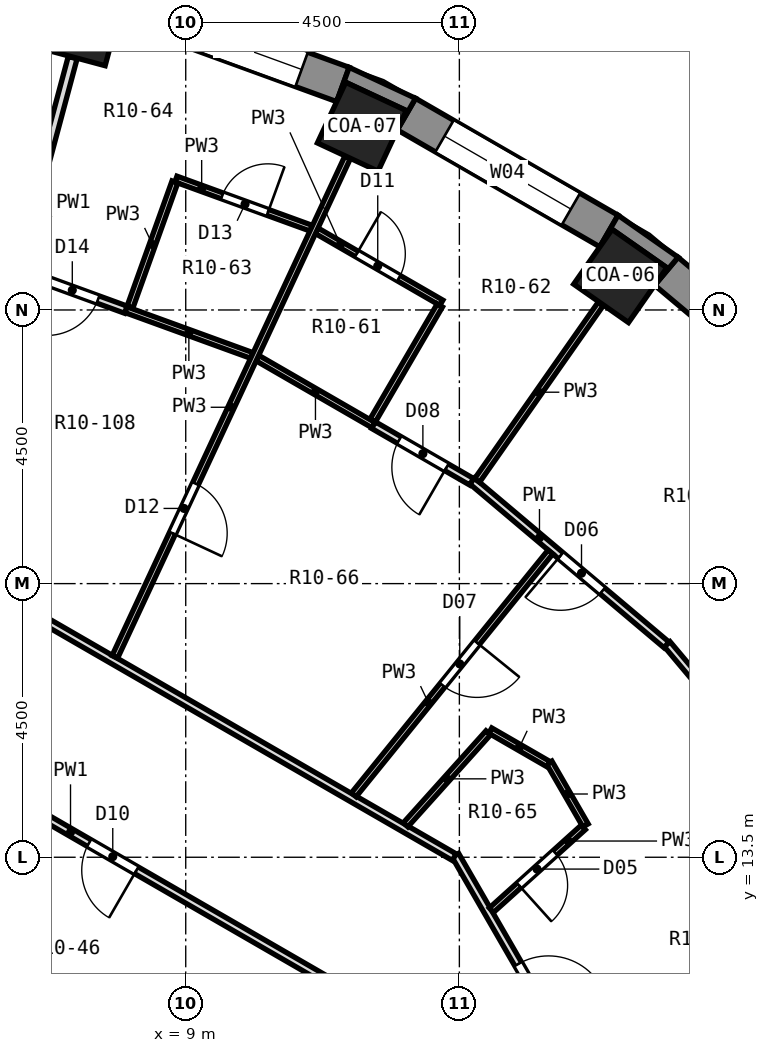
"""IFC4 building model, lengths in metres.
Left out: names, types, materials, properties, quantities, classifications, styles, units other than length and angle.
Written with IfcOpenShell. Run it as: python <this file> out.ifc"""

import sys

from ifc_helpers import new_model, si_unit, direction, frame, frame_2d, origin, origin_2d, place, context, subcontext, project, spatial, polyline, rectangle, outline, extrude, element, fill, save


model = new_model("IFC4")
c1 = context("Model", 3, precision=1e-05, world=origin(), true_north=direction((0.0, 1.0)))
c2 = subcontext(c1, "Body", "Model", "MODEL_VIEW")
j1 = project(units=[si_unit("LENGTHUNIT", "METRE"), si_unit("PLANEANGLEUNIT", "RADIAN")], contexts=[c1])
p1 = place(None, origin())
s1 = spatial("IfcSite", under=j1, at=p1, CompositionType="ELEMENT")
p2 = place(p1, origin())
s2 = spatial("IfcBuilding", under=s1, at=p2, CompositionType="ELEMENT")
p3 = place(p2, frame((0.0, 0.0, 36.2)))
s3 = spatial("IfcBuildingStorey", under=s2, at=p3, CompositionType="ELEMENT", Elevation=36.2)
for number, where, z_axis, x_axis in (
    (1, (16.146, 23.059, 0.0), (0.0, 0.0, 1.0), (0.574, 0.819, 0.0)),
    (2, (11.897, 25.512, 0.0), (0.0, 0.0, 1.0), (0.423, 0.906, 0.0)),
    (3, (7.286, 27.191, 0.0), (0.0, 0.0, 1.0), (0.259, 0.966, 0.0)),
):
    element("IfcColumn", number, at=place(p3, frame(where, z_axis=z_axis, x_axis=x_axis)), inside=s3, PredefinedType="COLUMN", context=c2, shape_type="SweptSolid", body=[
        extrude(rectangle(XDim=1.1, YDim=1.1, at=origin_2d()), origin(), (0.0, 0.0, 1.0), 3.3),
    ])
p4 = place(p3, frame((19.85, 20.665, 0.0), z_axis=(0.0, 0.0, 1.0), x_axis=(-0.766026164483, 0.642809392687, 0.0)))
e4 = element("IfcWall", 4, at=p4, inside=s3, PredefinedType="SOLIDWALL", context=c2, shape_type="SweptSolid", body=[
    extrude(rectangle(XDim=3.846, YDim=0.6, at=frame_2d((1.923, 0.0))), origin(), (0.0, 0.0, 1.0), 2.75),
])
p5 = place(p4, frame((0.723, 0.0, 0.9)))
e5 = element("IfcOpeningElement", 5, at=p5, cuts=e4, PredefinedType="OPENING", context=c2, shape_type="SweptSolid", body=[
    extrude(rectangle(XDim=2.4, YDim=1.8, at=frame_2d((1.2, 0.9))), frame((0.0, 0.312, 0.0), z_axis=(0.0, -1.0, 0.0), x_axis=(1.0, 0.0, 0.0)), (0.0, 0.0, 1.0), 0.624),
])
p6 = place(p3, frame((15.96, 23.798, 0.0), z_axis=(0.0, 0.0, 1.0), x_axis=(-0.86603124159, 0.499989888488, 0.0)))
e6 = element("IfcWall", 6, at=p6, inside=s3, PredefinedType="SOLIDWALL", context=c2, shape_type="SweptSolid", body=[
    extrude(rectangle(XDim=3.846, YDim=0.6, at=frame_2d((1.923, 0.0))), origin(), (0.0, 0.0, 1.0), 2.75),
])
p7 = place(p6, frame((0.723, 0.0, 0.9)))
e7 = element("IfcOpeningElement", 7, at=p7, cuts=e6, PredefinedType="OPENING", context=c2, shape_type="SweptSolid", body=[
    extrude(rectangle(XDim=2.4, YDim=1.8, at=frame_2d((1.2, 0.9))), frame((0.0, 0.312, 0.0), z_axis=(0.0, -1.0, 0.0), x_axis=(1.0, 0.0, 0.0)), (0.0, 0.0, 1.0), 0.624),
])
p8 = place(p3, frame((11.585, 26.208, 0.0), z_axis=(0.0, 0.0, 1.0), x_axis=(-0.939689588564, 0.342028474173, 0.0)))
e8 = element("IfcWall", 8, at=p8, inside=s3, PredefinedType="SOLIDWALL", context=c2, shape_type="SweptSolid", body=[
    extrude(rectangle(XDim=3.846, YDim=0.6, at=frame_2d((1.923, 0.0))), origin(), (0.0, 0.0, 1.0), 2.75),
])
p9 = place(p8, frame((0.723, 0.0, 0.9)))
e9 = element("IfcOpeningElement", 9, at=p9, cuts=e8, PredefinedType="OPENING", context=c2, shape_type="SweptSolid", body=[
    extrude(rectangle(XDim=2.4, YDim=1.8, at=frame_2d((1.2, 0.9))), frame((0.0, 0.312, 0.0), z_axis=(0.0, -1.0, 0.0), x_axis=(1.0, 0.0, 0.0)), (0.0, 0.0, 1.0), 0.624),
])
p10 = place(p3, origin())
e10 = element("IfcWall", 10, at=p10, inside=s3, PredefinedType="SOLIDWALL", context=c2, shape_type="SweptSolid", body=[
    extrude(outline(polyline([(17.097, 23.367), (16.11, 24.058), (15.81, 23.538), (16.011, 23.825), (16.912, 23.194), (16.711, 22.907), (17.097, 23.367)])), origin(), (0.0, 0.0, 1.0), 2.75),
])
p11 = place(p3, origin())
e11 = element("IfcWall", 11, at=p11, inside=s3, PredefinedType="SOLIDWALL", context=c2, shape_type="SweptSolid", body=[
    extrude(outline(polyline([(11.688, 26.49), (11.483, 25.926), (11.631, 26.243), (12.628, 25.779), (12.479, 25.461), (12.78, 25.981), (11.688, 26.49)])), origin(), (0.0, 0.0, 1.0), 2.75),
])
p12 = place(p3, frame((13.434, 13.532, 0.0), z_axis=(0.0, 0.0, 1.0), x_axis=(0.499949220301, -0.866054719472, 0.0)))
e12 = element("IfcWall", 12, at=p12, inside=s3, PredefinedType="PARTITIONING", context=c2, shape_type="SweptSolid", body=[
    extrude(rectangle(XDim=4.039, YDim=0.125, at=frame_2d((2.019, 0.0))), origin(), (0.0, 0.0, 1.0), 2.75),
])
p13 = place(p12, frame((2.065, 0.0, 0.0)))
e13 = element("IfcOpeningElement", 13, at=p13, cuts=e12, PredefinedType="OPENING", context=c2, shape_type="SweptSolid", body=[
    extrude(rectangle(XDim=1.0, YDim=2.1, at=frame_2d((0.5, 1.05))), frame((0.0, 0.074, 0.0), z_axis=(0.0, -1.0, 0.0), x_axis=(1.0, 0.0, 0.0)), (0.0, 0.0, 1.0), 0.149),
])
p14 = place(p3, frame((14.978, 15.057, 0.0), z_axis=(0.0, 0.0, 1.0), x_axis=(0.500342374835, -0.865827643324, 0.0)))
e14 = element("IfcWall", 14, at=p14, inside=s3, PredefinedType="PARTITIONING", context=c2, shape_type="SweptSolid", body=[
    extrude(rectangle(XDim=1.193, YDim=0.1, at=frame_2d((0.597, 0.0))), origin(), (0.0, 0.0, 1.0), 2.75),
])
p15 = place(p3, frame((16.916, 17.006, 0.0), z_axis=(0.0, 0.0, 1.0), x_axis=(0.642649535047, -0.766160280297, 0.0)))
e15 = element("IfcWall", 15, at=p15, inside=s3, PredefinedType="PARTITIONING", context=c2, shape_type="SweptSolid", body=[
    extrude(rectangle(XDim=1.489, YDim=0.125, at=frame_2d((0.744, 0.0))), origin(), (0.0, 0.0, 1.0), 2.75),
])
p16 = place(p3, frame((13.709, 19.689, 0.0), z_axis=(0.0, 0.0, 1.0), x_axis=(0.764384092804, -0.644761164051, 0.0)))
e16 = element("IfcWall", 16, at=p16, inside=s3, PredefinedType="PARTITIONING", context=c2, shape_type="SweptSolid", body=[
    extrude(rectangle(XDim=4.182, YDim=0.125, at=frame_2d((2.091, 0.0))), origin(), (0.0, 0.0, 1.0), 2.75),
])
p17 = place(p16, frame((1.904, 0.0, 0.0)))
e17 = element("IfcOpeningElement", 17, at=p17, cuts=e16, PredefinedType="OPENING", context=c2, shape_type="SweptSolid", body=[
    extrude(rectangle(XDim=0.9, YDim=2.1, at=frame_2d((0.45, 1.05))), frame((0.0, 0.074, 0.0), z_axis=(0.0, -1.0, 0.0), x_axis=(1.0, 0.0, 0.0)), (0.0, 0.0, 1.0), 0.149),
])
p18 = place(p3, frame((3.313, 12.175, 0.0), z_axis=(0.0, 0.0, 1.0), x_axis=(0.866015366624, -0.500017384468, 0.0)))
e18 = element("IfcWall", 18, at=p18, inside=s3, PredefinedType="PARTITIONING", context=c2, shape_type="SweptSolid", body=[
    extrude(rectangle(XDim=6.425, YDim=0.1, at=frame_2d((3.212, 0.0))), origin(), (0.0, 0.0, 1.0), 2.75),
])
p19 = place(p18, frame((2.769, 0.0, 0.0)))
e19 = element("IfcOpeningElement", 19, at=p19, cuts=e18, PredefinedType="OPENING", context=c2, shape_type="SweptSolid", body=[
    extrude(rectangle(XDim=0.9, YDim=2.1, at=frame_2d((0.45, 1.05))), frame((0.0, 0.062, 0.0), z_axis=(0.0, -1.0, 0.0), x_axis=(1.0, 0.0, 0.0)), (0.0, 0.0, 1.0), 0.124),
])
p20 = place(p3, frame((4.117, 15.636, 0.0), z_axis=(0.0, 0.0, 1.0), x_axis=(0.866026957163, -0.49999730946, 0.0)))
e20 = element("IfcWall", 20, at=p20, inside=s3, PredefinedType="PARTITIONING", context=c2, shape_type="SweptSolid", body=[
    extrude(rectangle(XDim=8.432, YDim=0.125, at=frame_2d((4.216, 0.0))), origin(), (0.0, 0.0, 1.0), 2.75),
])
p21 = place(p20, frame((3.802, 0.0, 0.0)))
e21 = element("IfcOpeningElement", 21, at=p21, cuts=e20, PredefinedType="OPENING", context=c2, shape_type="SweptSolid", body=[
    extrude(rectangle(XDim=0.9, YDim=2.1, at=frame_2d((0.45, 1.05))), frame((0.0, 0.074, 0.0), z_axis=(0.0, -1.0, 0.0), x_axis=(1.0, 0.0, 0.0)), (0.0, 0.0, 1.0), 0.149),
])
p22 = place(p3, frame((4.867, 18.436, 0.0), z_axis=(0.0, 0.0, 1.0), x_axis=(0.86605048973, -0.49995654735, 0.0)))
e22 = element("IfcWall", 22, at=p22, inside=s3, PredefinedType="PARTITIONING", context=c2, shape_type="SweptSolid", body=[
    extrude(rectangle(XDim=9.871, YDim=0.125, at=frame_2d((4.935, 0.0))), origin(), (0.0, 0.0, 1.0), 2.75),
])
p23 = place(p3, frame((14.008, 15.583, 0.0), z_axis=(0.0, 0.0, 1.0), x_axis=(0.866288740656, -0.49954360952, 0.0)))
e23 = element("IfcWall", 23, at=p23, inside=s3, PredefinedType="PARTITIONING", context=c2, shape_type="SweptSolid", body=[
    extrude(rectangle(XDim=1.103, YDim=0.1, at=frame_2d((0.552, 0.0))), origin(), (0.0, 0.0, 1.0), 2.75),
])
p24 = place(p3, frame((10.178, 21.709, 0.0), z_axis=(0.0, 0.0, 1.0), x_axis=(0.865986508459, -0.50006736263, 0.0)))
e24 = element("IfcWall", 24, at=p24, inside=s3, PredefinedType="PARTITIONING", context=c2, shape_type="SweptSolid", body=[
    extrude(rectangle(XDim=2.206, YDim=0.1, at=frame_2d((1.103, 0.0))), origin(), (0.0, 0.0, 1.0), 2.75),
])
p25 = place(p3, frame((12.088, 20.606, 0.0), z_axis=(0.0, 0.0, 1.0), x_axis=(0.866104801807, -0.499862453367, 0.0)))
e25 = element("IfcWall", 25, at=p25, inside=s3, PredefinedType="PARTITIONING", context=c2, shape_type="SweptSolid", body=[
    extrude(rectangle(XDim=1.862, YDim=0.125, at=frame_2d((0.931, 0.0))), origin(), (0.0, 0.0, 1.0), 2.75),
])
p26 = place(p25, frame((0.487, 0.0, 0.0)))
e26 = element("IfcOpeningElement", 26, at=p26, cuts=e25, PredefinedType="OPENING", context=c2, shape_type="SweptSolid", body=[
    extrude(rectangle(XDim=0.9, YDim=2.1, at=frame_2d((0.45, 1.05))), frame((0.0, 0.074, 0.0), z_axis=(0.0, -1.0, 0.0), x_axis=(1.0, 0.0, 0.0)), (0.0, 0.0, 1.0), 0.149),
])
p27 = place(p3, frame((11.154, 23.802, 0.0), z_axis=(0.0, 0.0, 1.0), x_axis=(0.865910737143, -0.500198555877, 0.0)))
e27 = element("IfcWall", 27, at=p27, inside=s3, PredefinedType="PARTITIONING", context=c2, shape_type="SweptSolid", body=[
    extrude(rectangle(XDim=2.367, YDim=0.1, at=frame_2d((1.184, 0.0))), origin(), (0.0, 0.0, 1.0), 2.75),
])
p28 = place(p27, frame((0.759, 0.0, 0.0)))
e28 = element("IfcOpeningElement", 28, at=p28, cuts=e27, PredefinedType="OPENING", context=c2, shape_type="SweptSolid", body=[
    extrude(rectangle(XDim=0.8, YDim=2.1, at=frame_2d((0.4, 1.05))), frame((0.0, 0.062, 0.0), z_axis=(0.0, -1.0, 0.0), x_axis=(1.0, 0.0, 0.0)), (0.0, 0.0, 1.0), 0.124),
])
p29 = place(p3, frame((8.015, 22.505, 0.0), z_axis=(0.0, 0.0, 1.0), x_axis=(0.939744943051, -0.341876354856, 0.0)))
e29 = element("IfcWall", 29, at=p29, inside=s3, PredefinedType="PARTITIONING", context=c2, shape_type="SweptSolid", body=[
    extrude(rectangle(XDim=2.206, YDim=0.1, at=frame_2d((1.103, 0.0))), origin(), (0.0, 0.0, 1.0), 2.75),
])
p30 = place(p3, frame((6.278, 23.138, 0.0), z_axis=(0.0, 0.0, 1.0), x_axis=(0.939538772486, -0.34244254262, 0.0)))
e30 = element("IfcWall", 30, at=p30, inside=s3, PredefinedType="PARTITIONING", context=c2, shape_type="SweptSolid", body=[
    extrude(rectangle(XDim=1.849, YDim=0.125, at=frame_2d((0.925, 0.0))), origin(), (0.0, 0.0, 1.0), 2.75),
])
p31 = place(p30, frame((0.462, 0.0, 0.0)))
e31 = element("IfcOpeningElement", 31, at=p31, cuts=e30, PredefinedType="OPENING", context=c2, shape_type="SweptSolid", body=[
    extrude(rectangle(XDim=0.9, YDim=2.1, at=frame_2d((0.45, 1.05))), frame((0.0, 0.074, 0.0), z_axis=(0.0, -1.0, 0.0), x_axis=(1.0, 0.0, 0.0)), (0.0, 0.0, 1.0), 0.149),
])
p32 = place(p3, frame((8.839, 24.653, 0.0), z_axis=(0.0, 0.0, 1.0), x_axis=(0.939787401385, -0.341759623416, 0.0)))
e32 = element("IfcWall", 32, at=p32, inside=s3, PredefinedType="PARTITIONING", context=c2, shape_type="SweptSolid", body=[
    extrude(rectangle(XDim=2.367, YDim=0.1, at=frame_2d((1.184, 0.0))), origin(), (0.0, 0.0, 1.0), 2.75),
])
p33 = place(p32, frame((0.809, 0.0, 0.0)))
e33 = element("IfcOpeningElement", 33, at=p33, cuts=e32, PredefinedType="OPENING", context=c2, shape_type="SweptSolid", body=[
    extrude(rectangle(XDim=0.8, YDim=2.1, at=frame_2d((0.4, 1.05))), frame((0.0, 0.062, 0.0), z_axis=(0.0, -1.0, 0.0), x_axis=(1.0, 0.0, 0.0)), (0.0, 0.0, 1.0), 0.124),
])
p34 = place(p3, frame((14.026, 12.629, 0.0), z_axis=(0.0, 0.0, 1.0), x_axis=(0.742989731373, 0.669302815678, 0.0)))
e34 = element("IfcWall", 34, at=p34, inside=s3, PredefinedType="PARTITIONING", context=c2, shape_type="SweptSolid", body=[
    extrude(rectangle(XDim=2.034, YDim=0.1, at=frame_2d((1.017, 0.0))), origin(), (0.0, 0.0, 1.0), 2.75),
])
p35 = place(p34, frame((0.611, 0.0, 0.0)))
e35 = element("IfcOpeningElement", 35, at=p35, cuts=e34, PredefinedType="OPENING", context=c2, shape_type="SweptSolid", body=[
    extrude(rectangle(XDim=0.8, YDim=2.1, at=frame_2d((0.4, 1.05))), frame((0.0, 0.062, 0.0), z_axis=(0.0, -1.0, 0.0), x_axis=(1.0, 0.0, 0.0)), (0.0, 0.0, 1.0), 0.124),
])
p36 = place(p3, frame((12.616, 14.034, 0.0), z_axis=(0.0, 0.0, 1.0), x_axis=(0.668327519136, 0.743867143491, 0.0)))
e36 = element("IfcWall", 36, at=p36, inside=s3, PredefinedType="PARTITIONING", context=c2, shape_type="SweptSolid", body=[
    extrude(rectangle(XDim=2.033, YDim=0.1, at=frame_2d((1.017, 0.0))), origin(), (0.0, 0.0, 1.0), 2.75),
])
p37 = place(p3, frame((11.763, 14.527, 0.0), z_axis=(0.0, 0.0, 1.0), x_axis=(0.629330794749, 0.777137536592, 0.0)))
e37 = element("IfcWall", 37, at=p37, inside=s3, PredefinedType="PARTITIONING", context=c2, shape_type="SweptSolid", body=[
    extrude(rectangle(XDim=5.139, YDim=0.1, at=frame_2d((2.569, 0.0))), origin(), (0.0, 0.0, 1.0), 2.75),
])
p38 = place(p37, frame((2.32, 0.0, 0.0)))
e38 = element("IfcOpeningElement", 38, at=p38, cuts=e37, PredefinedType="OPENING", context=c2, shape_type="SweptSolid", body=[
    extrude(rectangle(XDim=0.9, YDim=2.1, at=frame_2d((0.45, 1.05))), frame((0.0, 0.062, 0.0), z_axis=(0.0, -1.0, 0.0), x_axis=(1.0, 0.0, 0.0)), (0.0, 0.0, 1.0), 0.124),
])
p39 = place(p3, frame((13.791, 19.695, 0.0), z_axis=(0.0, 0.0, 1.0), x_axis=(0.573554740156, 0.8191672357, 0.0)))
e39 = element("IfcWall", 39, at=p39, inside=s3, PredefinedType="PARTITIONING", context=c2, shape_type="SweptSolid", body=[
    extrude(rectangle(XDim=3.547, YDim=0.1, at=frame_2d((1.773, 0.0))), origin(), (0.0, 0.0, 1.0), 2.75),
])
p40 = place(p3, frame((12.076, 20.685, 0.0), z_axis=(0.0, 0.0, 1.0), x_axis=(0.503871025524, 0.863778900898, 0.0)))
e40 = element("IfcWall", 40, at=p40, inside=s3, PredefinedType="PARTITIONING", context=c2, shape_type="SweptSolid", body=[
    extrude(rectangle(XDim=2.188, YDim=0.1, at=frame_2d((1.094, 0.0))), origin(), (0.0, 0.0, 1.0), 2.75),
])
p41 = place(p3, frame((7.835, 16.796, 0.0), z_axis=(0.0, 0.0, 1.0), x_axis=(0.422351185038, 0.906432279046, 0.0)))
e41 = element("IfcWall", 41, at=p41, inside=s3, PredefinedType="PARTITIONING", context=c2, shape_type="SweptSolid", body=[
    extrude(rectangle(XDim=9.057, YDim=0.1, at=frame_2d((4.528, 0.0))), origin(), (0.0, 0.0, 1.0), 2.75),
])
p42 = place(p41, frame((2.243, 0.0, 0.0)))
e42 = element("IfcOpeningElement", 42, at=p42, cuts=e41, PredefinedType="OPENING", context=c2, shape_type="SweptSolid", body=[
    extrude(rectangle(XDim=0.9, YDim=2.1, at=frame_2d((0.45, 1.05))), frame((0.0, 0.062, 0.0), z_axis=(0.0, -1.0, 0.0), x_axis=(1.0, 0.0, 0.0)), (0.0, 0.0, 1.0), 0.124),
])
p43 = place(p3, frame((8.083, 22.547, 0.0), z_axis=(0.0, 0.0, 1.0), x_axis=(0.337806451735, 0.9412155976, 0.0)))
e43 = element("IfcWall", 43, at=p43, inside=s3, PredefinedType="PARTITIONING", context=c2, shape_type="SweptSolid", body=[
    extrude(rectangle(XDim=2.188, YDim=0.1, at=frame_2d((1.094, 0.0))), origin(), (0.0, 0.0, 1.0), 2.75),
])
p44 = place(p3, frame((4.947, 18.46, 0.0), z_axis=(0.0, 0.0, 1.0), x_axis=(0.258782623342, 0.965935584734, 0.0)))
e44 = element("IfcWall", 44, at=p44, inside=s3, PredefinedType="PARTITIONING", context=c2, shape_type="SweptSolid", body=[
    extrude(rectangle(XDim=8.479, YDim=0.15, at=frame_2d((4.239, 0.0))), origin(), (0.0, 0.0, 1.0), 2.75),
])
p45 = place(p7, origin())
e45 = element("IfcWindow", 45, at=p45, inside=s3, PartitioningType="SINGLE_PANEL", PredefinedType="WINDOW", context=c2, shape_type="SweptSolid", body=[
    extrude(rectangle(XDim=2.4, YDim=1.8, at=frame_2d((1.2, 0.9))), frame((0.0, 0.18, 0.0), z_axis=(0.0, -1.0, 0.0), x_axis=(1.0, 0.0, 0.0)), (0.0, 0.0, 1.0), 0.06),
])
fill(e7, e45)
p46 = place(p9, origin())
e46 = element("IfcWindow", 46, at=p46, inside=s3, PartitioningType="SINGLE_PANEL", PredefinedType="WINDOW", context=c2, shape_type="SweptSolid", body=[
    extrude(rectangle(XDim=2.4, YDim=1.8, at=frame_2d((1.2, 0.9))), frame((0.0, 0.18, 0.0), z_axis=(0.0, -1.0, 0.0), x_axis=(1.0, 0.0, 0.0)), (0.0, 0.0, 1.0), 0.06),
])
fill(e9, e46)
p47 = place(p13, origin())
e47 = element("IfcDoor", 47, at=p47, inside=s3, OperationType="SINGLE_SWING_RIGHT", PredefinedType="DOOR", context=c2, shape_type="SweptSolid", body=[
    extrude(rectangle(XDim=1.0, YDim=2.1, at=frame_2d((0.5, 1.05))), frame((0.0, 0.025, 0.0), z_axis=(0.0, -1.0, 0.0), x_axis=(1.0, 0.0, 0.0)), (0.0, 0.0, 1.0), 0.05),
])
fill(e13, e47)
p48 = place(p35, frame((0.8, 0.0, 0.0), z_axis=(0.0, 0.0, 1.0), x_axis=(-1.0, 0.0, 0.0)))
e48 = element("IfcDoor", 48, at=p48, inside=s3, OperationType="SINGLE_SWING_RIGHT", PredefinedType="DOOR", context=c2, shape_type="SweptSolid", body=[
    extrude(rectangle(XDim=0.8, YDim=2.1, at=frame_2d((0.4, 1.05))), frame((0.0, 0.025, 0.0), z_axis=(0.0, -1.0, 0.0), x_axis=(1.0, 0.0, 0.0)), (0.0, 0.0, 1.0), 0.05),
])
fill(e35, e48)
p49 = place(p17, frame((0.9, 0.0, 0.0), z_axis=(0.0, 0.0, 1.0), x_axis=(-1.0, 0.0, 0.0)))
e49 = element("IfcDoor", 49, at=p49, inside=s3, OperationType="SINGLE_SWING_RIGHT", PredefinedType="DOOR", context=c2, shape_type="SweptSolid", body=[
    extrude(rectangle(XDim=0.9, YDim=2.1, at=frame_2d((0.45, 1.05))), frame((0.0, 0.025, 0.0), z_axis=(0.0, -1.0, 0.0), x_axis=(1.0, 0.0, 0.0)), (0.0, 0.0, 1.0), 0.05),
])
fill(e17, e49)
p50 = place(p38, frame((0.9, 0.0, 0.0), z_axis=(0.0, 0.0, 1.0), x_axis=(-1.0, 0.0, 0.0)))
e50 = element("IfcDoor", 50, at=p50, inside=s3, OperationType="SINGLE_SWING_LEFT", PredefinedType="DOOR", context=c2, shape_type="SweptSolid", body=[
    extrude(rectangle(XDim=0.9, YDim=2.1, at=frame_2d((0.45, 1.05))), frame((0.0, 0.025, 0.0), z_axis=(0.0, -1.0, 0.0), x_axis=(1.0, 0.0, 0.0)), (0.0, 0.0, 1.0), 0.05),
])
fill(e38, e50)
p51 = place(p26, frame((0.9, 0.0, 0.0), z_axis=(0.0, 0.0, 1.0), x_axis=(-1.0, 0.0, 0.0)))
e51 = element("IfcDoor", 51, at=p51, inside=s3, OperationType="SINGLE_SWING_LEFT", PredefinedType="DOOR", context=c2, shape_type="SweptSolid", body=[
    extrude(rectangle(XDim=0.9, YDim=2.1, at=frame_2d((0.45, 1.05))), frame((0.0, 0.025, 0.0), z_axis=(0.0, -1.0, 0.0), x_axis=(1.0, 0.0, 0.0)), (0.0, 0.0, 1.0), 0.05),
])
fill(e26, e51)
p52 = place(p21, frame((0.9, 0.0, 0.0), z_axis=(0.0, 0.0, 1.0), x_axis=(-1.0, 0.0, 0.0)))
e52 = element("IfcDoor", 52, at=p52, inside=s3, OperationType="SINGLE_SWING_LEFT", PredefinedType="DOOR", context=c2, shape_type="SweptSolid", body=[
    extrude(rectangle(XDim=0.9, YDim=2.1, at=frame_2d((0.45, 1.05))), frame((0.0, 0.025, 0.0), z_axis=(0.0, -1.0, 0.0), x_axis=(1.0, 0.0, 0.0)), (0.0, 0.0, 1.0), 0.05),
])
fill(e21, e52)
p53 = place(p28, origin())
e53 = element("IfcDoor", 53, at=p53, inside=s3, OperationType="SINGLE_SWING_LEFT", PredefinedType="DOOR", context=c2, shape_type="SweptSolid", body=[
    extrude(rectangle(XDim=0.8, YDim=2.1, at=frame_2d((0.4, 1.05))), frame((0.0, 0.025, 0.0), z_axis=(0.0, -1.0, 0.0), x_axis=(1.0, 0.0, 0.0)), (0.0, 0.0, 1.0), 0.05),
])
fill(e28, e53)
p54 = place(p42, frame((0.9, 0.0, 0.0), z_axis=(0.0, 0.0, 1.0), x_axis=(-1.0, 0.0, 0.0)))
e54 = element("IfcDoor", 54, at=p54, inside=s3, OperationType="SINGLE_SWING_RIGHT", PredefinedType="DOOR", context=c2, shape_type="SweptSolid", body=[
    extrude(rectangle(XDim=0.9, YDim=2.1, at=frame_2d((0.45, 1.05))), frame((0.0, 0.025, 0.0), z_axis=(0.0, -1.0, 0.0), x_axis=(1.0, 0.0, 0.0)), (0.0, 0.0, 1.0), 0.05),
])
fill(e42, e54)
p55 = place(p33, origin())
e55 = element("IfcDoor", 55, at=p55, inside=s3, OperationType="SINGLE_SWING_RIGHT", PredefinedType="DOOR", context=c2, shape_type="SweptSolid", body=[
    extrude(rectangle(XDim=0.8, YDim=2.1, at=frame_2d((0.4, 1.05))), frame((0.0, 0.025, 0.0), z_axis=(0.0, -1.0, 0.0), x_axis=(1.0, 0.0, 0.0)), (0.0, 0.0, 1.0), 0.05),
])
fill(e33, e55)
p56 = place(p31, frame((0.9, 0.0, 0.0), z_axis=(0.0, 0.0, 1.0), x_axis=(-1.0, 0.0, 0.0)))
e56 = element("IfcDoor", 56, at=p56, inside=s3, OperationType="SINGLE_SWING_RIGHT", PredefinedType="DOOR", context=c2, shape_type="SweptSolid", body=[
    extrude(rectangle(XDim=0.9, YDim=2.1, at=frame_2d((0.45, 1.05))), frame((0.0, 0.025, 0.0), z_axis=(0.0, -1.0, 0.0), x_axis=(1.0, 0.0, 0.0)), (0.0, 0.0, 1.0), 0.05),
])
fill(e31, e56)
save(model, sys.argv[1])
